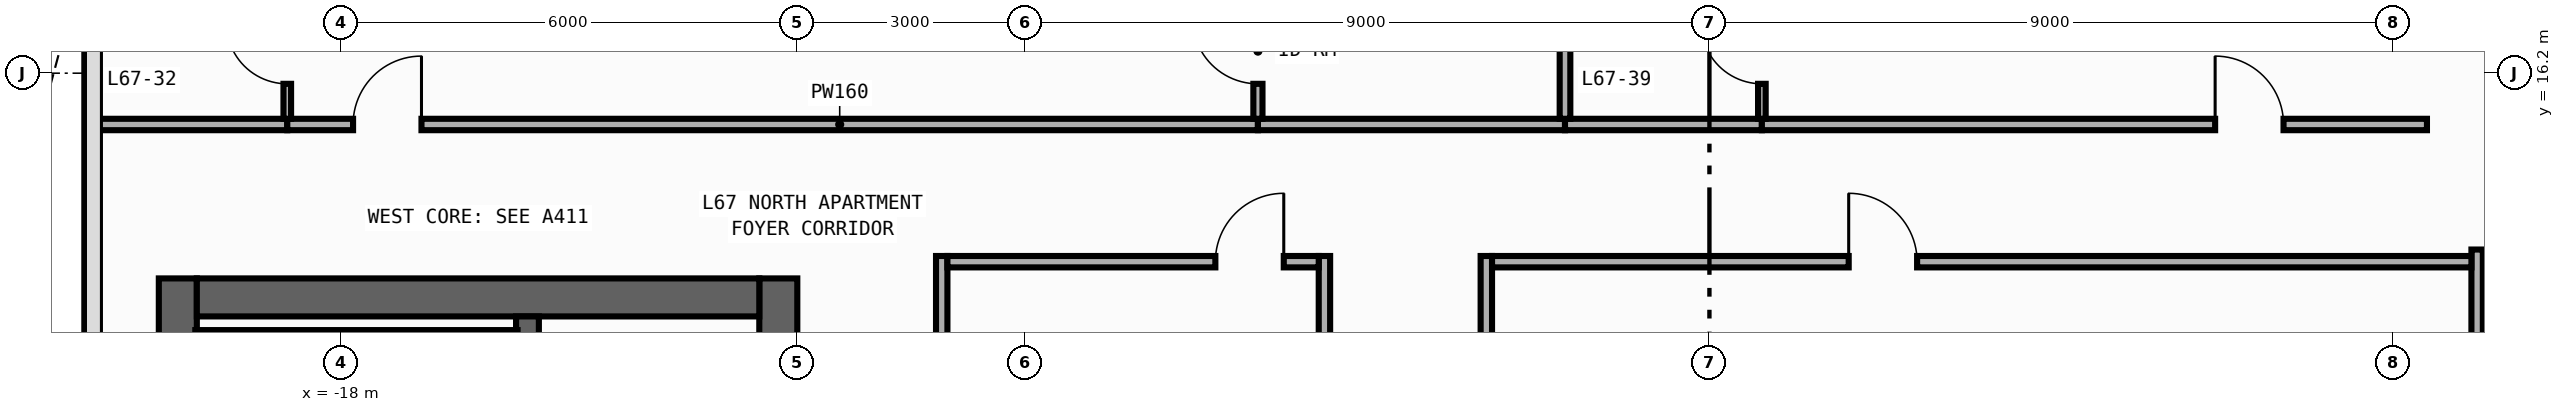
"""IFC4 building model, lengths in metres.
Left out: names, types, materials, properties, quantities, classifications, styles, units other than length and angle.
Written with IfcOpenShell. Run it as: python <this file> out.ifc"""

import sys

from ifc_helpers import new_model, si_unit, direction, frame, frame_2d, origin, place, context, subcontext, project, spatial, rectangle, extrude, element, fill, save


model = new_model("IFC4")
c1 = context("Model", 3, precision=1e-05, world=origin(), true_north=direction((0.0, 1.0)))
c2 = subcontext(c1, "Body", "Model", "MODEL_VIEW")
j1 = project(units=[si_unit("LENGTHUNIT", "METRE"), si_unit("PLANEANGLEUNIT", "RADIAN")], contexts=[c1])
p1 = place(None, origin())
s1 = spatial("IfcSite", under=j1, at=p1, CompositionType="ELEMENT")
p2 = place(p1, origin())
s2 = spatial("IfcBuilding", under=s1, at=p2, CompositionType="ELEMENT")
p3 = place(p2, frame((0.0, 0.0, 281.4)))
s3 = spatial("IfcBuildingStorey", under=s2, at=p3, CompositionType="ELEMENT", Elevation=281.4)
p4 = place(p3, frame((-20.15, -13.5, 0.0), z_axis=(0.0, 0.0, 1.0), x_axis=(0.0, 1.0, 0.0)))
e1 = element("IfcWall", 1, at=p4, inside=s3, PredefinedType="SHEAR", context=c2, shape_type="SweptSolid", body=[
    extrude(rectangle(XDim=27.0, YDim=0.5, at=frame_2d((13.5, 0.0))), origin(), (0.0, 0.0, 1.0), 3.54),
])
p5 = place(p3, frame((-12.25, -13.5, 0.0), z_axis=(0.0, 0.0, 1.0), x_axis=(0.0, 1.0, 0.0)))
e2 = element("IfcWall", 2, at=p5, inside=s3, PredefinedType="SHEAR", context=c2, shape_type="SweptSolid", body=[
    extrude(rectangle(XDim=27.0, YDim=0.5, at=frame_2d((13.5, 0.0))), origin(), (0.0, 0.0, 1.0), 3.54),
])
p6 = place(p5, frame((15.175, 0.0, 0.0)))
e3 = element("IfcOpeningElement", 3, at=p6, cuts=e2, PredefinedType="OPENING", context=c2, shape_type="SweptSolid", body=[
    extrude(rectangle(XDim=0.85, YDim=2.1, at=frame_2d((0.425, 1.05))), frame((0.0, 0.26, 0.0), z_axis=(0.0, -1.0, 0.0), x_axis=(1.0, 0.0, 0.0)), (0.0, 0.0, 1.0), 0.52),
])
p7 = place(p5, frame((21.275, 0.0, 0.0)))
e4 = element("IfcOpeningElement", 4, at=p7, cuts=e2, PredefinedType="OPENING", context=c2, shape_type="SweptSolid", body=[
    extrude(rectangle(XDim=0.85, YDim=2.1, at=frame_2d((0.425, 1.05))), frame((0.0, 0.26, 0.0), z_axis=(0.0, -1.0, 0.0), x_axis=(1.0, 0.0, 0.0)), (0.0, 0.0, 1.0), 0.52),
])
p8 = place(p5, frame((4.275, 0.0, 0.0)))
e5 = element("IfcOpeningElement", 5, at=p8, cuts=e2, PredefinedType="OPENING", context=c2, shape_type="SweptSolid", body=[
    extrude(rectangle(XDim=0.85, YDim=2.1, at=frame_2d((0.425, 1.05))), frame((0.0, 0.26, 0.0), z_axis=(0.0, -1.0, 0.0), x_axis=(1.0, 0.0, 0.0)), (0.0, 0.0, 1.0), 0.52),
])
p9 = place(p5, frame((10.275, 0.0, 0.0)))
e6 = element("IfcOpeningElement", 6, at=p9, cuts=e2, PredefinedType="OPENING", context=c2, shape_type="SweptSolid", body=[
    extrude(rectangle(XDim=0.85, YDim=2.1, at=frame_2d((0.425, 1.05))), frame((0.0, 0.26, 0.0), z_axis=(0.0, -1.0, 0.0), x_axis=(1.0, 0.0, 0.0)), (0.0, 0.0, 1.0), 0.52),
])
p10 = place(p5, frame((12.725, 0.0, 0.0)))
e7 = element("IfcOpeningElement", 7, at=p10, cuts=e2, PredefinedType="OPENING", context=c2, shape_type="SweptSolid", body=[
    extrude(rectangle(XDim=1.15, YDim=2.2, at=frame_2d((0.575, 1.1))), frame((0.0, 0.26, 0.0), z_axis=(0.0, -1.0, 0.0), x_axis=(1.0, 0.0, 0.0)), (0.0, 0.0, 1.0), 0.52),
])
p11 = place(p5, frame((1.625, 0.0, 0.0)))
e8 = element("IfcOpeningElement", 8, at=p11, cuts=e2, PredefinedType="OPENING", context=c2, shape_type="SweptSolid", body=[
    extrude(rectangle(XDim=0.85, YDim=2.1, at=frame_2d((0.425, 1.05))), frame((0.0, 0.26, 0.0), z_axis=(0.0, -1.0, 0.0), x_axis=(1.0, 0.0, 0.0)), (0.0, 0.0, 1.0), 0.52),
])
p12 = place(p3, frame((-19.9, 13.25, 0.0), z_axis=(0.0, 0.0, 1.0), x_axis=(1.0, 0.0, 0.0)))
e9 = element("IfcWall", 9, at=p12, inside=s3, PredefinedType="SHEAR", context=c2, shape_type="SweptSolid", body=[
    extrude(rectangle(XDim=7.4, YDim=0.5, at=frame_2d((3.7, 0.0))), origin(), (0.0, 0.0, 1.0), 3.54),
])
p13 = place(p3, frame((-15.55, -13.0, 0.0), z_axis=(0.0, 0.0, 1.0), x_axis=(0.0, 1.0, 0.0)))
e10 = element("IfcWall", 10, at=p13, inside=s3, PredefinedType="SHEAR", context=c2, shape_type="SweptSolid", body=[
    extrude(rectangle(XDim=26.0, YDim=0.3, at=frame_2d((13.0, 0.0))), origin(), (0.0, 0.0, 1.0), 3.54),
])
p14 = place(p13, frame((12.225, 0.0, 0.0)))
e11 = element("IfcOpeningElement", 11, at=p14, cuts=e10, PredefinedType="OPENING", context=c2, shape_type="SweptSolid", body=[
    extrude(rectangle(XDim=1.15, YDim=2.2, at=frame_2d((0.575, 1.1))), frame((0.0, 0.16, 0.0), z_axis=(0.0, -1.0, 0.0), x_axis=(1.0, 0.0, 0.0)), (0.0, 0.0, 1.0), 0.32),
])
p15 = place(p13, frame((1.125, 0.0, 0.0)))
e12 = element("IfcOpeningElement", 12, at=p15, cuts=e10, PredefinedType="OPENING", context=c2, shape_type="SweptSolid", body=[
    extrude(rectangle(XDim=0.85, YDim=2.1, at=frame_2d((0.425, 1.05))), frame((0.0, 0.16, 0.0), z_axis=(0.0, -1.0, 0.0), x_axis=(1.0, 0.0, 0.0)), (0.0, 0.0, 1.0), 0.32),
])
p16 = place(p3, frame((-19.92, 12.71, 0.0), z_axis=(0.0, 0.0, 1.0), x_axis=(1.0, 0.0, 0.0)))
e13 = element("IfcWall", 13, at=p16, inside=s3, PredefinedType="SHEAR", context=c2, shape_type="SweptSolid", body=[
    extrude(rectangle(XDim=4.24, YDim=0.22, at=frame_2d((2.12, 0.0))), origin(), (0.0, 0.0, 1.0), 3.54),
])
p17 = place(p3, frame((-10.1, -2.81, 0.0), z_axis=(0.0, 0.0, 1.0), x_axis=(0.0, 1.0, 0.0)))
e14 = element("IfcWall", 14, at=p17, inside=s3, PredefinedType="PARTITIONING", context=c2, shape_type="SweptSolid", body=[
    extrude(rectangle(XDim=16.605, YDim=0.15, at=frame_2d((8.302, 0.0))), origin(), (0.0, 0.0, 1.0), 3.54),
])
p18 = place(p17, frame((7.751, 0.0, 0.0)))
e15 = element("IfcOpeningElement", 15, at=p18, cuts=e14, PredefinedType="OPENING", context=c2, shape_type="SweptSolid", body=[
    extrude(rectangle(XDim=0.9, YDim=2.15, at=frame_2d((0.45, 1.075))), frame((0.0, 0.085, 0.0), z_axis=(0.0, -1.0, 0.0), x_axis=(1.0, 0.0, 0.0)), (0.0, 0.0, 1.0), 0.17),
])
p19 = place(p3, frame((10.1, -2.81, 0.0), z_axis=(0.0, 0.0, 1.0), x_axis=(0.0, 1.0, 0.0)))
e16 = element("IfcWall", 16, at=p19, inside=s3, PredefinedType="PARTITIONING", context=c2, shape_type="SweptSolid", body=[
    extrude(rectangle(XDim=16.69, YDim=0.15, at=frame_2d((8.345, 0.0))), origin(), (0.0, 0.0, 1.0), 3.54),
])
p20 = place(p19, frame((7.694, 0.0, 0.0)))
e17 = element("IfcOpeningElement", 17, at=p20, cuts=e16, PredefinedType="OPENING", context=c2, shape_type="SweptSolid", body=[
    extrude(rectangle(XDim=0.9, YDim=2.15, at=frame_2d((0.45, 1.075))), frame((0.0, 0.085, 0.0), z_axis=(0.0, -1.0, 0.0), x_axis=(1.0, 0.0, 0.0)), (0.0, 0.0, 1.0), 0.17),
])
p21 = place(p3, frame((-5.065, -2.66, 0.0), z_axis=(0.0, 0.0, 1.0), x_axis=(0.0, 1.0, 0.0)))
e18 = element("IfcWall", 18, at=p21, inside=s3, PredefinedType="PARTITIONING", context=c2, shape_type="SweptSolid", body=[
    extrude(rectangle(XDim=16.455, YDim=0.15, at=frame_2d((8.228, 0.0))), origin(), (0.0, 0.0, 1.0), 3.19),
])
p22 = place(p21, frame((7.677, 0.0, 0.0)))
e19 = element("IfcOpeningElement", 19, at=p22, cuts=e18, PredefinedType="OPENING", context=c2, shape_type="SweptSolid", body=[
    extrude(rectangle(XDim=0.9, YDim=2.15, at=frame_2d((0.45, 1.075))), frame((0.0, 0.085, 0.0), z_axis=(0.0, -1.0, 0.0), x_axis=(1.0, 0.0, 0.0)), (0.0, 0.0, 1.0), 0.17),
])
p23 = place(p3, frame((-2.935, -2.66, 0.0), z_axis=(0.0, 0.0, 1.0), x_axis=(0.0, 1.0, 0.0)))
e20 = element("IfcWall", 20, at=p23, inside=s3, PredefinedType="PARTITIONING", context=c2, shape_type="SweptSolid", body=[
    extrude(rectangle(XDim=16.455, YDim=0.15, at=frame_2d((8.228, 0.0))), origin(), (0.0, 0.0, 1.0), 3.54),
])
p24 = place(p23, frame((7.677, 0.0, 0.0)))
e21 = element("IfcOpeningElement", 21, at=p24, cuts=e20, PredefinedType="OPENING", context=c2, shape_type="SweptSolid", body=[
    extrude(rectangle(XDim=0.9, YDim=2.15, at=frame_2d((0.45, 1.075))), frame((0.0, 0.085, 0.0), z_axis=(0.0, -1.0, 0.0), x_axis=(1.0, 0.0, 0.0)), (0.0, 0.0, 1.0), 0.17),
])
p25 = place(p3, frame((-21.255, 15.525, 0.0), z_axis=(0.0, 0.0, 1.0), x_axis=(1.0, 0.0, 0.0)))
e22 = element("IfcWall", 22, at=p25, inside=s3, PredefinedType="PARTITIONING", context=c2, shape_type="SweptSolid", body=[
    extrude(rectangle(XDim=2.545, YDim=0.15, at=frame_2d((1.272, 0.0))), origin(), (0.0, 0.0, 1.0), 3.54),
])
p26 = place(p3, frame((-18.71, 15.525, 0.0), z_axis=(0.0, 0.0, 1.0), x_axis=(1.0, 0.0, 0.0)))
e23 = element("IfcWall", 23, at=p26, inside=s3, PredefinedType="PARTITIONING", context=c2, shape_type="SweptSolid", body=[
    extrude(rectangle(XDim=12.77, YDim=0.15, at=frame_2d((6.385, 0.0))), origin(), (0.0, 0.0, 1.0), 3.54),
])
p27 = place(p26, frame((0.865, 0.0, 0.0)))
e24 = element("IfcOpeningElement", 24, at=p27, cuts=e23, PredefinedType="OPENING", context=c2, shape_type="SweptSolid", body=[
    extrude(rectangle(XDim=0.9, YDim=2.15, at=frame_2d((0.45, 1.075))), frame((0.0, 0.085, 0.0), z_axis=(0.0, -1.0, 0.0), x_axis=(1.0, 0.0, 0.0)), (0.0, 0.0, 1.0), 0.17),
])
p28 = place(p3, frame((-5.94, 15.525, 0.0), z_axis=(0.0, 0.0, 1.0), x_axis=(1.0, 0.0, 0.0)))
e25 = element("IfcWall", 25, at=p28, inside=s3, PredefinedType="PARTITIONING", context=c2, shape_type="SweptSolid", body=[
    extrude(rectangle(XDim=4.04, YDim=0.15, at=frame_2d((2.02, 0.0))), origin(), (0.0, 0.0, 1.0), 3.54),
])
p29 = place(p3, frame((-1.9, 15.525, 0.0), z_axis=(0.0, 0.0, 1.0), x_axis=(1.0, 0.0, 0.0)))
e26 = element("IfcWall", 26, at=p29, inside=s3, PredefinedType="PARTITIONING", context=c2, shape_type="SweptSolid", body=[
    extrude(rectangle(XDim=2.59, YDim=0.15, at=frame_2d((1.295, 0.0))), origin(), (0.0, 0.0, 1.0), 3.54),
])
p30 = place(p3, frame((0.69, 15.525, 0.0), z_axis=(0.0, 0.0, 1.0), x_axis=(1.0, 0.0, 0.0)))
e27 = element("IfcWall", 27, at=p30, inside=s3, PredefinedType="PARTITIONING", context=c2, shape_type="SweptSolid", body=[
    extrude(rectangle(XDim=8.75, YDim=0.15, at=frame_2d((4.375, 0.0))), origin(), (0.0, 0.0, 1.0), 3.54),
])
p31 = place(p30, frame((5.963, 0.0, 0.0)))
e28 = element("IfcOpeningElement", 28, at=p31, cuts=e27, PredefinedType="OPENING", context=c2, shape_type="SweptSolid", body=[
    extrude(rectangle(XDim=0.9, YDim=2.15, at=frame_2d((0.45, 1.075))), frame((0.0, 0.085, 0.0), z_axis=(0.0, -1.0, 0.0), x_axis=(1.0, 0.0, 0.0)), (0.0, 0.0, 1.0), 0.17),
])
p32 = place(p3, frame((-10.025, 13.72, 0.0), z_axis=(0.0, 0.0, 1.0), x_axis=(1.0, 0.0, 0.0)))
e29 = element("IfcWall", 29, at=p32, inside=s3, PredefinedType="PARTITIONING", context=c2, shape_type="SweptSolid", body=[
    extrude(rectangle(XDim=4.885, YDim=0.15, at=frame_2d((2.442, 0.0))), origin(), (0.0, 0.0, 1.0), 3.54),
])
p33 = place(p32, frame((3.525, 0.0, 0.0)))
e30 = element("IfcOpeningElement", 30, at=p33, cuts=e29, PredefinedType="OPENING", context=c2, shape_type="SweptSolid", body=[
    extrude(rectangle(XDim=0.9, YDim=2.15, at=frame_2d((0.45, 1.075))), frame((0.0, 0.085, 0.0), z_axis=(0.0, -1.0, 0.0), x_axis=(1.0, 0.0, 0.0)), (0.0, 0.0, 1.0), 0.17),
])
p34 = place(p3, frame((-2.86, 13.72, 0.0), z_axis=(0.0, 0.0, 1.0), x_axis=(1.0, 0.0, 0.0)))
e31 = element("IfcWall", 31, at=p34, inside=s3, PredefinedType="PARTITIONING", context=c2, shape_type="SweptSolid", body=[
    extrude(rectangle(XDim=12.885, YDim=0.15, at=frame_2d((6.442, 0.0))), origin(), (0.0, 0.0, 1.0), 3.54),
])
p35 = place(p34, frame((4.692, 0.0, 0.0)))
e32 = element("IfcOpeningElement", 32, at=p35, cuts=e31, PredefinedType="OPENING", context=c2, shape_type="SweptSolid", body=[
    extrude(rectangle(XDim=0.9, YDim=2.15, at=frame_2d((0.45, 1.075))), frame((0.0, 0.085, 0.0), z_axis=(0.0, -1.0, 0.0), x_axis=(1.0, 0.0, 0.0)), (0.0, 0.0, 1.0), 0.17),
])
p36 = place(p3, frame((-18.71, 15.6, 0.0), z_axis=(0.0, 0.0, 1.0), x_axis=(0.0, 1.0, 0.0)))
e33 = element("IfcWall", 33, at=p36, inside=s3, PredefinedType="PARTITIONING", context=c2, shape_type="SweptSolid", body=[
    extrude(rectangle(XDim=2.5, YDim=0.1, at=frame_2d((1.25, 0.0))), origin(), (0.0, 0.0, 1.0), 3.54),
])
p37 = place(p36, frame((0.46, 0.0, 0.0)))
e34 = element("IfcOpeningElement", 34, at=p37, cuts=e33, PredefinedType="OPENING", context=c2, shape_type="SweptSolid", body=[
    extrude(rectangle(XDim=0.8, YDim=2.1, at=frame_2d((0.4, 1.05))), frame((0.0, 0.06, 0.0), z_axis=(0.0, -1.0, 0.0), x_axis=(1.0, 0.0, 0.0)), (0.0, 0.0, 1.0), 0.12),
])
p38 = place(p3, frame((-5.94, 15.6, 0.0), z_axis=(0.0, 0.0, 1.0), x_axis=(0.0, 1.0, 0.0)))
e35 = element("IfcWall", 35, at=p38, inside=s3, PredefinedType="PARTITIONING", context=c2, shape_type="SweptSolid", body=[
    extrude(rectangle(XDim=4.5, YDim=0.12, at=frame_2d((2.25, 0.0))), origin(), (0.0, 0.0, 1.0), 3.54),
])
p39 = place(p38, frame((0.46, 0.0, 0.0)))
e36 = element("IfcOpeningElement", 36, at=p39, cuts=e35, PredefinedType="OPENING", context=c2, shape_type="SweptSolid", body=[
    extrude(rectangle(XDim=0.86, YDim=2.15, at=frame_2d((0.43, 1.075))), frame((0.0, 0.07, 0.0), z_axis=(0.0, -1.0, 0.0), x_axis=(1.0, 0.0, 0.0)), (0.0, 0.0, 1.0), 0.14),
])
p40 = place(p3, frame((-1.9, 15.6, 0.0), z_axis=(0.0, 0.0, 1.0), x_axis=(0.0, 1.0, 0.0)))
e37 = element("IfcWall", 37, at=p40, inside=s3, PredefinedType="PARTITIONING", context=c2, shape_type="SweptSolid", body=[
    extrude(rectangle(XDim=2.5, YDim=0.14, at=frame_2d((1.25, 0.0))), origin(), (0.0, 0.0, 1.0), 3.54),
])
p41 = place(p3, frame((0.69, 15.6, 0.0), z_axis=(0.0, 0.0, 1.0), x_axis=(0.0, 1.0, 0.0)))
e38 = element("IfcWall", 38, at=p41, inside=s3, PredefinedType="PARTITIONING", context=c2, shape_type="SweptSolid", body=[
    extrude(rectangle(XDim=2.5, YDim=0.1, at=frame_2d((1.25, 0.0))), origin(), (0.0, 0.0, 1.0), 3.54),
])
p42 = place(p41, frame((0.46, 0.0, 0.0)))
e39 = element("IfcOpeningElement", 39, at=p42, cuts=e38, PredefinedType="OPENING", context=c2, shape_type="SweptSolid", body=[
    extrude(rectangle(XDim=0.8, YDim=2.1, at=frame_2d((0.4, 1.05))), frame((0.0, 0.06, 0.0), z_axis=(0.0, -1.0, 0.0), x_axis=(1.0, 0.0, 0.0)), (0.0, 0.0, 1.0), 0.12),
])
p43 = place(p27, origin())
e40 = element("IfcDoor", 40, at=p43, inside=s3, OperationType="SINGLE_SWING_RIGHT", PredefinedType="DOOR", context=c2, shape_type="SweptSolid", body=[
    extrude(rectangle(XDim=0.9, YDim=2.15, at=frame_2d((0.45, 1.075))), frame((0.0, 0.025, 0.0), z_axis=(0.0, -1.0, 0.0), x_axis=(1.0, 0.0, 0.0)), (0.0, 0.0, 1.0), 0.05),
])
fill(e24, e40)
p44 = place(p31, origin())
e41 = element("IfcDoor", 41, at=p44, inside=s3, OperationType="SINGLE_SWING_LEFT", PredefinedType="DOOR", context=c2, shape_type="SweptSolid", body=[
    extrude(rectangle(XDim=0.9, YDim=2.15, at=frame_2d((0.45, 1.075))), frame((0.0, 0.025, 0.0), z_axis=(0.0, -1.0, 0.0), x_axis=(1.0, 0.0, 0.0)), (0.0, 0.0, 1.0), 0.05),
])
fill(e28, e41)
p45 = place(p33, origin())
e42 = element("IfcDoor", 42, at=p45, inside=s3, OperationType="SINGLE_SWING_RIGHT", PredefinedType="DOOR", context=c2, shape_type="SweptSolid", body=[
    extrude(rectangle(XDim=0.9, YDim=2.15, at=frame_2d((0.45, 1.075))), frame((0.0, 0.025, 0.0), z_axis=(0.0, -1.0, 0.0), x_axis=(1.0, 0.0, 0.0)), (0.0, 0.0, 1.0), 0.05),
])
fill(e30, e42)
p46 = place(p35, origin())
e43 = element("IfcDoor", 43, at=p46, inside=s3, OperationType="SINGLE_SWING_LEFT", PredefinedType="DOOR", context=c2, shape_type="SweptSolid", body=[
    extrude(rectangle(XDim=0.9, YDim=2.15, at=frame_2d((0.45, 1.075))), frame((0.0, 0.025, 0.0), z_axis=(0.0, -1.0, 0.0), x_axis=(1.0, 0.0, 0.0)), (0.0, 0.0, 1.0), 0.05),
])
fill(e32, e43)
p47 = place(p37, origin())
e44 = element("IfcDoor", 44, at=p47, inside=s3, OperationType="SINGLE_SWING_RIGHT", PredefinedType="DOOR", context=c2, shape_type="SweptSolid", body=[
    extrude(rectangle(XDim=0.8, YDim=2.1, at=frame_2d((0.4, 1.05))), frame((0.0, 0.025, 0.0), z_axis=(0.0, -1.0, 0.0), x_axis=(1.0, 0.0, 0.0)), (0.0, 0.0, 1.0), 0.05),
])
fill(e34, e44)
p48 = place(p39, origin())
e45 = element("IfcDoor", 45, at=p48, inside=s3, OperationType="SINGLE_SWING_RIGHT", PredefinedType="DOOR", context=c2, shape_type="SweptSolid", body=[
    extrude(rectangle(XDim=0.86, YDim=2.15, at=frame_2d((0.43, 1.075))), frame((0.0, 0.025, 0.0), z_axis=(0.0, -1.0, 0.0), x_axis=(1.0, 0.0, 0.0)), (0.0, 0.0, 1.0), 0.05),
])
fill(e36, e45)
p49 = place(p42, origin())
e46 = element("IfcDoor", 46, at=p49, inside=s3, OperationType="SINGLE_SWING_RIGHT", PredefinedType="DOOR", context=c2, shape_type="SweptSolid", body=[
    extrude(rectangle(XDim=0.8, YDim=2.1, at=frame_2d((0.4, 1.05))), frame((0.0, 0.025, 0.0), z_axis=(0.0, -1.0, 0.0), x_axis=(1.0, 0.0, 0.0)), (0.0, 0.0, 1.0), 0.05),
])
fill(e39, e46)
save(model, sys.argv[1])
